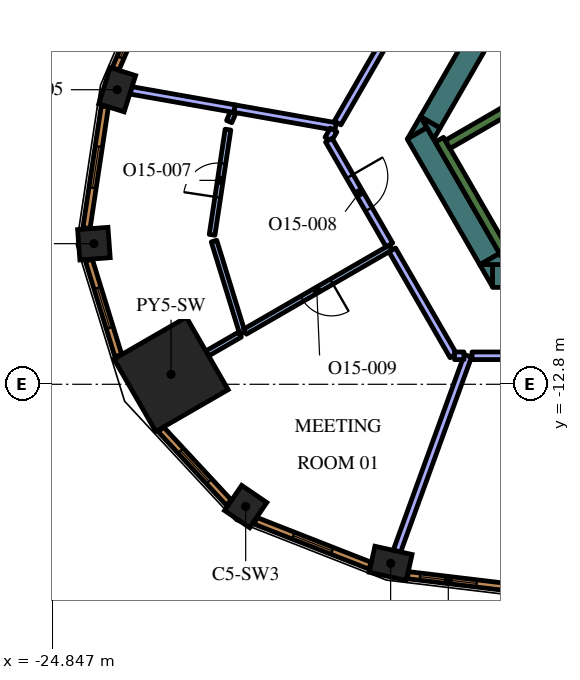
"""IFC4 building model, lengths in metres.
Left out: names, types, materials, properties, quantities, classifications, styles, units other than length and angle.
Written with IfcOpenShell. Run it as: python <this file> out.ifc"""

import sys

from ifc_helpers import new_model, si_unit, direction, frame, frame_2d, origin, origin_2d, place, context, subcontext, project, spatial, polyline, rectangle, outline, extrude, element, fill, save


model = new_model("IFC4")
c1 = context("Model", 3, precision=1e-05, world=origin(), true_north=direction((0.0, 1.0)))
c2 = subcontext(c1, "Body", "Model", "MODEL_VIEW")
j1 = project(units=[si_unit("LENGTHUNIT", "METRE"), si_unit("PLANEANGLEUNIT", "RADIAN")], contexts=[c1])
p1 = place(None, origin())
s1 = spatial("IfcSite", under=j1, at=p1, CompositionType="ELEMENT")
p2 = place(p1, origin())
s2 = spatial("IfcBuilding", under=s1, at=p2, CompositionType="ELEMENT")
p3 = place(p2, frame((0.0, 0.0, 317.4)))
s3 = spatial("IfcBuildingStorey", under=s2, at=p3, CompositionType="ELEMENT", Elevation=317.4)
p4 = place(p3, frame((-21.718, -12.539, 0.0), z_axis=(0.0, 0.0, 1.0), x_axis=(-0.866025403784, -0.5, 0.0)))
e1 = element("IfcColumn", 1, at=p4, inside=s3, PredefinedType="COLUMN", context=c2, shape_type="SweptSolid", body=[
    extrude(rectangle(XDim=2.2, YDim=2.2, at=origin_2d()), origin(), (0.0, 0.0, 1.0), 4.2),
])
for number, where, z_axis, x_axis in (
    (2, (-15.941, -17.512, 0.0), (0.0, 0.0, 1.0), (0.976, -0.217, 0.0)),
    (3, (-23.136, -5.049, 0.0), (0.0, 0.0, 1.0), (-0.3, -0.954, 0.0)),
):
    element("IfcColumn", number, at=place(p3, frame(where, z_axis=z_axis, x_axis=x_axis)), inside=s3, PredefinedType="COLUMN", context=c2, shape_type="SweptSolid", body=[
        extrude(rectangle(XDim=1.0, YDim=0.7, at=origin_2d()), origin(), (0.0, 0.0, 1.0), 4.2),
    ])
for number, where, z_axis, x_axis in (
    (4, (-23.748, -9.1, 0.0), (0.0, 0.0, 1.0), (0.075, -0.997, 0.0)),
    (5, (-19.754, -16.017, 0.0), (0.0, 0.0, 1.0), (0.826, -0.563, 0.0)),
):
    element("IfcColumn", number, at=place(p3, frame(where, z_axis=z_axis, x_axis=x_axis)), inside=s3, PredefinedType="COLUMN", context=c2, shape_type="SweptSolid", body=[
        extrude(rectangle(XDim=0.8, YDim=0.8, at=origin_2d()), origin(), (0.0, 0.0, 1.0), 4.2),
    ])
p5 = place(p3, frame((8.904, -9.95, 0.0), z_axis=(0.0, 0.0, 1.0), x_axis=(-1.0, 0.0, 0.0)))
e6 = element("IfcWall", 6, at=p5, inside=s3, PredefinedType="SOLIDWALL", context=c2, shape_type="SweptSolid", body=[
    extrude(rectangle(XDim=22.161, YDim=0.6, at=frame_2d((11.081, 0.0))), origin(), (0.0, 0.0, 1.0), 4.2),
])
p6 = place(p3, origin())
e7 = element("IfcWall", 7, at=p6, inside=s3, PredefinedType="SOLIDWALL", context=c2, shape_type="SweptSolid", body=[
    extrude(outline(polyline([(-13.597, -9.65), (-13.259, -9.65), (-13.259, -10.236), (-13.597, -9.65)])), origin(), (0.0, 0.0, 1.0), 4.2),
])
p7 = place(p3, frame((-13.333, -9.506, 0.0), z_axis=(0.0, 0.0, 1.0), x_axis=(-0.500019073792, 0.866014391245, 0.0)))
e8 = element("IfcWall", 8, at=p7, inside=s3, PredefinedType="SOLIDWALL", context=c2, shape_type="SweptSolid", body=[
    extrude(rectangle(XDim=3.823, YDim=0.6, at=frame_2d((1.912, 0.0))), origin(), (0.0, 0.0, 1.0), 4.2),
])
e9 = element("IfcWall", 9, at=p6, inside=s3, PredefinedType="SOLIDWALL", context=c2, shape_type="SweptSolid", body=[
    extrude(outline(polyline([(-14.987, -6.043), (-15.493, -6.335), (-15.156, -5.75), (-14.987, -6.043)])), origin(), (0.0, 0.0, 1.0), 4.2),
])
e10 = element("IfcWall", 10, at=p6, inside=s3, PredefinedType="SOLIDWALL", context=c2, shape_type="SweptSolid", body=[
    extrude(outline(polyline([(-12.904, -9.65), (-13.58, -9.65), (-13.073, -9.357), (-12.904, -9.65)])), origin(), (0.0, 0.0, 1.0), 4.2),
])
p8 = place(p3, frame((-13.432, -3.364, 0.0), z_axis=(0.0, 0.0, 1.0), x_axis=(-0.499960127962, -0.866048422692, 0.0)))
e11 = element("IfcWall", 11, at=p8, inside=s3, PredefinedType="SOLIDWALL", context=c2, shape_type="SweptSolid", body=[
    extrude(rectangle(XDim=2.934, YDim=0.6, at=frame_2d((1.467, 0.0))), origin(), (0.0, 0.0, 1.0), 4.2),
])
e12 = element("IfcWall", 12, at=p6, inside=s3, PredefinedType="SOLIDWALL", context=c2, shape_type="SweptSolid", body=[
    extrude(outline(polyline([(-14.809, -6.35), (-15.147, -5.764), (-14.64, -6.057), (-14.809, -6.35)])), origin(), (0.0, 0.0, 1.0), 4.2),
])
p9 = place(p3, frame((-12.84, -9.511, 0.0), z_axis=(0.0, 0.0, 1.0), x_axis=(-0.499997733992, 0.866026712061, 0.0)))
e13 = element("IfcWall", 13, at=p9, inside=s3, PredefinedType="SOLIDWALL", context=c2, shape_type="SweptSolid", body=[
    extrude(rectangle(XDim=3.634, YDim=0.25, at=frame_2d((1.817, 0.0))), origin(), (0.0, 0.0, 1.0), 4.2),
])
p10 = place(p3, frame((-14.44, -6.49, 0.0), z_axis=(0.0, 0.0, 1.0), x_axis=(0.866022966069, 0.500004222222, 0.0)))
e14 = element("IfcWall", 14, at=p10, inside=s3, PredefinedType="SOLIDWALL", context=c2, shape_type="SweptSolid", body=[
    extrude(rectangle(XDim=6.8, YDim=0.25, at=frame_2d((3.4, 0.0))), origin(), (0.0, 0.0, 1.0), 4.2),
])
p11 = place(p3, frame((-15.774, -17.19, 0.0), z_axis=(0.0, 0.0, 1.0), x_axis=(0.341821907823, 0.93976474893, 0.0)))
e15 = element("IfcWall", 15, at=p11, inside=s3, PredefinedType="PARTITIONING", context=c2, shape_type="SweptSolid", body=[
    extrude(rectangle(XDim=5.469, YDim=0.2, at=frame_2d((2.735, 0.0))), origin(), (0.0, 0.0, 1.0), 3.5),
])
p12 = place(p3, frame((-13.799, -12.05, 0.0), z_axis=(0.0, 0.0, 1.0), x_axis=(1.0, 0.0, 0.0)))
e16 = element("IfcWall", 16, at=p12, inside=s3, PredefinedType="PARTITIONING", context=c2, shape_type="SweptSolid", body=[
    extrude(rectangle(XDim=8.769, YDim=0.2, at=frame_2d((4.384, 0.0))), origin(), (0.0, 0.0, 1.0), 3.5),
])
p13 = place(p3, frame((-20.039, -5.549, 0.0), z_axis=(0.0, 0.0, 1.0), x_axis=(-0.984771168486, 0.173855531173, 0.0)))
e17 = element("IfcWall", 17, at=p13, inside=s3, PredefinedType="PARTITIONING", context=c2, shape_type="SweptSolid", body=[
    extrude(rectangle(XDim=2.778, YDim=0.2, at=frame_2d((1.389, 0.0))), origin(), (0.0, 0.0, 1.0), 3.5),
])
p14 = place(p3, frame((-17.388, -6.017, 0.0), z_axis=(0.0, 0.0, 1.0), x_axis=(-0.984769902927, 0.173862699534, 0.0)))
e18 = element("IfcWall", 18, at=p14, inside=s3, PredefinedType="PARTITIONING", context=c2, shape_type="SweptSolid", body=[
    extrude(rectangle(XDim=2.7, YDim=0.2, at=frame_2d((1.35, 0.0))), origin(), (0.0, 0.0, 1.0), 3.5),
])
p15 = place(p3, frame((-13.683, 0.4, 0.0), z_axis=(0.0, 0.0, 1.0), x_axis=(-0.500004109969, -0.86602303088, 0.0)))
e19 = element("IfcWall", 19, at=p15, inside=s3, PredefinedType="PARTITIONING", context=c2, shape_type="SweptSolid", body=[
    extrude(rectangle(XDim=7.303, YDim=0.2, at=frame_2d((3.652, 0.0))), origin(), (0.0, 0.0, 1.0), 3.5),
])
p16 = place(p15, frame((2.8, 0.0, 0.0)))
e20 = element("IfcOpeningElement", 20, at=p16, cuts=e19, PredefinedType="OPENING", context=c2, shape_type="SweptSolid", body=[
    extrude(rectangle(XDim=1.8, YDim=2.1, at=frame_2d((0.9, 1.05))), frame((0.0, 0.11, 0.0), z_axis=(0.0, -1.0, 0.0), x_axis=(1.0, 0.0, 0.0)), (0.0, 0.0, 1.0), 0.22),
])
p17 = place(p3, frame((-20.083, -5.643, 0.0), z_axis=(0.0, 0.0, 1.0), x_axis=(-0.392924203078, -0.919570862215, 0.0)))
e21 = element("IfcWall", 21, at=p17, inside=s3, PredefinedType="PARTITIONING", context=c2, shape_type="SweptSolid", body=[
    extrude(rectangle(XDim=0.267, YDim=0.15, at=frame_2d((0.133, 0.0))), origin(), (0.0, 0.0, 1.0), 3.5),
])
p18 = place(p3, frame((-20.638, -8.867, 0.0), z_axis=(0.0, 0.0, 1.0), x_axis=(0.149402322172, 0.988776489471, 0.0)))
e22 = element("IfcWall", 22, at=p18, inside=s3, PredefinedType="PARTITIONING", context=c2, shape_type="SweptSolid", body=[
    extrude(rectangle(XDim=2.799, YDim=0.15, at=frame_2d((1.4, 0.0))), origin(), (0.0, 0.0, 1.0), 3.5),
])
p19 = place(p18, frame((0.999, 0.0, 0.0)))
e23 = element("IfcOpeningElement", 23, at=p19, cuts=e22, PredefinedType="OPENING", context=c2, shape_type="SweptSolid", body=[
    extrude(rectangle(XDim=0.9, YDim=2.1, at=frame_2d((0.45, 1.05))), frame((0.0, 0.085, 0.0), z_axis=(0.0, -1.0, 0.0), x_axis=(1.0, 0.0, 0.0)), (0.0, 0.0, 1.0), 0.17),
])
p20 = place(p3, frame((-20.587, -9.032, 0.0), z_axis=(0.0, 0.0, 1.0), x_axis=(0.294593354479, -0.95562270562, 0.0)))
e24 = element("IfcWall", 24, at=p20, inside=s3, PredefinedType="PARTITIONING", context=c2, shape_type="SweptSolid", body=[
    extrude(rectangle(XDim=2.535, YDim=0.15, at=frame_2d((1.268, 0.0))), origin(), (0.0, 0.0, 1.0), 3.5),
])
p21 = place(p3, frame((-19.907, -11.493, 0.0), z_axis=(0.0, 0.0, 1.0), x_axis=(-0.866083074959, -0.499900097289, 0.0)))
e25 = element("IfcWall", 25, at=p21, inside=s3, PredefinedType="PARTITIONING", context=c2, shape_type="SweptSolid", body=[
    extrude(rectangle(XDim=0.991, YDim=0.15, at=frame_2d((0.496, 0.0))), origin(), (0.0, 0.0, 1.0), 3.5),
])
p22 = place(p3, frame((-15.935, -9.2, 0.0), z_axis=(0.0, 0.0, 1.0), x_axis=(-0.866021420858, -0.500006898567, 0.0)))
e26 = element("IfcWall", 26, at=p22, inside=s3, PredefinedType="PARTITIONING", context=c2, shape_type="SweptSolid", body=[
    extrude(rectangle(XDim=4.433, YDim=0.15, at=frame_2d((2.217, 0.0))), origin(), (0.0, 0.0, 1.0), 3.5),
])
p23 = place(p22, frame((1.8, 0.0, 0.0)))
e27 = element("IfcOpeningElement", 27, at=p23, cuts=e26, PredefinedType="OPENING", context=c2, shape_type="SweptSolid", body=[
    extrude(rectangle(XDim=0.9, YDim=2.1, at=frame_2d((0.45, 1.05))), frame((0.0, 0.085, 0.0), z_axis=(0.0, -1.0, 0.0), x_axis=(1.0, 0.0, 0.0)), (0.0, 0.0, 1.0), 0.17),
])
p24 = place(p3, frame((-17.441, -6.109, 0.0), z_axis=(0.0, 0.0, 1.0), x_axis=(-0.500102178127, -0.865966403178, 0.0)))
e28 = element("IfcWall", 28, at=p24, inside=s3, PredefinedType="PARTITIONING", context=c2, shape_type="SweptSolid", body=[
    extrude(rectangle(XDim=0.278, YDim=0.2, at=frame_2d((0.139, 0.0))), origin(), (0.0, 0.0, 1.0), 3.5),
])
p25 = place(p3, frame((-17.565, -6.376, 0.0), z_axis=(0.0, 0.0, 1.0), x_axis=(0.499963479838, -0.866046487683, 0.0)))
e29 = element("IfcWall", 29, at=p25, inside=s3, PredefinedType="PARTITIONING", context=c2, shape_type="SweptSolid", body=[
    extrude(rectangle(XDim=3.186, YDim=0.2, at=frame_2d((1.593, 0.0))), origin(), (0.0, 0.0, 1.0), 3.5),
])
p26 = place(p25, frame((1.1, 0.0, 0.0)))
e30 = element("IfcOpeningElement", 30, at=p26, cuts=e29, PredefinedType="OPENING", context=c2, shape_type="SweptSolid", body=[
    extrude(rectangle(XDim=1.0, YDim=2.1, at=frame_2d((0.5, 1.05))), frame((0.0, 0.11, 0.0), z_axis=(0.0, -1.0, 0.0), x_axis=(1.0, 0.0, 0.0)), (0.0, 0.0, 1.0), 0.22),
])
p27 = place(p3, frame((-15.897, -9.265, 0.0), z_axis=(0.0, 0.0, 1.0), x_axis=(0.500033484244, -0.866006070784, 0.0)))
e31 = element("IfcWall", 31, at=p27, inside=s3, PredefinedType="PARTITIONING", context=c2, shape_type="SweptSolid", body=[
    extrude(rectangle(XDim=3.216, YDim=0.2, at=frame_2d((1.608, 0.0))), origin(), (0.0, 0.0, 1.0), 3.5),
])
p28 = place(p3, frame((-14.26, -12.05, 0.0), z_axis=(0.0, 0.0, 1.0), x_axis=(1.0, 0.0, 0.0)))
e32 = element("IfcWall", 32, at=p28, inside=s3, PredefinedType="PARTITIONING", context=c2, shape_type="SweptSolid", body=[
    extrude(rectangle(XDim=0.248, YDim=0.2, at=frame_2d((0.124, 0.0))), origin(), (0.0, 0.0, 1.0), 3.5),
])
p29 = place(p3, frame((-15.487, -17.823, 0.0), z_axis=(0.0, 0.0, 1.0), x_axis=(0.992885582795, -0.119072328769, 0.0)))
e33 = element("IfcWall", 33, at=p29, inside=s3, PredefinedType="SOLIDWALL", context=c2, shape_type="SweptSolid", body=[
    extrude(rectangle(XDim=5.415, YDim=0.19, at=frame_2d((2.708, 0.0))), origin(), (0.0, 0.0, 1.0), 3.9),
])
p30 = place(p29, frame((0.323, 0.0, 0.6)))
e34 = element("IfcOpeningElement", 34, at=p30, cuts=e33, PredefinedType="OPENING", context=c2, shape_type="SweptSolid", body=[
    extrude(rectangle(XDim=1.5, YDim=2.85, at=frame_2d((0.75, 1.425))), frame((0.0, 0.105, 0.0), z_axis=(0.0, -1.0, 0.0), x_axis=(1.0, 0.0, 0.0)), (0.0, 0.0, 1.0), 0.21),
])
p31 = place(p29, frame((3.558, 0.0, 0.6)))
e35 = element("IfcOpeningElement", 35, at=p31, cuts=e33, PredefinedType="OPENING", context=c2, shape_type="SweptSolid", body=[
    extrude(rectangle(XDim=1.5, YDim=2.85, at=frame_2d((0.75, 1.425))), frame((0.0, 0.105, 0.0), z_axis=(0.0, -1.0, 0.0), x_axis=(1.0, 0.0, 0.0)), (0.0, 0.0, 1.0), 0.21),
])
p32 = place(p3, frame((-21.049, 0.478, 0.0), z_axis=(0.0, 0.0, 1.0), x_axis=(-0.393347848476, -0.919389726992, 0.0)))
e36 = element("IfcWall", 36, at=p32, inside=s3, PredefinedType="SOLIDWALL", context=c2, shape_type="SweptSolid", body=[
    extrude(rectangle(XDim=5.415, YDim=0.19, at=frame_2d((2.708, 0.0))), origin(), (0.0, 0.0, 1.0), 3.9),
])
p33 = place(p32, frame((0.357, 0.0, 0.6)))
e37 = element("IfcOpeningElement", 37, at=p33, cuts=e36, PredefinedType="OPENING", context=c2, shape_type="SweptSolid", body=[
    extrude(rectangle(XDim=1.5, YDim=2.85, at=frame_2d((0.75, 1.425))), frame((0.0, 0.105, 0.0), z_axis=(0.0, -1.0, 0.0), x_axis=(1.0, 0.0, 0.0)), (0.0, 0.0, 1.0), 0.21),
])
p34 = place(p32, frame((3.593, 0.0, 0.6)))
e38 = element("IfcOpeningElement", 38, at=p34, cuts=e36, PredefinedType="OPENING", context=c2, shape_type="SweptSolid", body=[
    extrude(rectangle(XDim=1.5, YDim=2.85, at=frame_2d((0.75, 1.425))), frame((0.0, 0.105, 0.0), z_axis=(0.0, -1.0, 0.0), x_axis=(1.0, 0.0, 0.0)), (0.0, 0.0, 1.0), 0.21),
])
p35 = place(p3, frame((-23.46, -5.488, 0.0), z_axis=(0.0, 0.0, 1.0), x_axis=(-0.149421055602, -0.988773658702, 0.0)))
e39 = element("IfcWall", 39, at=p35, inside=s3, PredefinedType="SOLIDWALL", context=c2, shape_type="SweptSolid", body=[
    extrude(rectangle(XDim=3.237, YDim=0.19, at=frame_2d((1.618, 0.0))), origin(), (0.0, 0.0, 1.0), 3.9),
])
p36 = place(p35, frame((1.068, 0.0, 0.6)))
e40 = element("IfcOpeningElement", 40, at=p36, cuts=e39, PredefinedType="OPENING", context=c2, shape_type="SweptSolid", body=[
    extrude(rectangle(XDim=1.1, YDim=2.85, at=frame_2d((0.55, 1.425))), frame((0.0, 0.105, 0.0), z_axis=(0.0, -1.0, 0.0), x_axis=(1.0, 0.0, 0.0)), (0.0, 0.0, 1.0), 0.21),
])
p37 = place(p3, frame((-23.881, -9.535, 0.0), z_axis=(0.0, 0.0, 1.0), x_axis=(0.294706210429, -0.9555879078, 0.0)))
e41 = element("IfcWall", 41, at=p37, inside=s3, PredefinedType="SOLIDWALL", context=c2, shape_type="SweptSolid", body=[
    extrude(rectangle(XDim=2.627, YDim=0.19, at=frame_2d((1.313, 0.0))), origin(), (0.0, 0.0, 1.0), 3.9),
])
p38 = place(p37, frame((0.763, 0.0, 0.6)))
e42 = element("IfcOpeningElement", 42, at=p38, cuts=e41, PredefinedType="OPENING", context=c2, shape_type="SweptSolid", body=[
    extrude(rectangle(XDim=1.1, YDim=2.85, at=frame_2d((0.55, 1.425))), frame((0.0, 0.105, 0.0), z_axis=(0.0, -1.0, 0.0), x_axis=(1.0, 0.0, 0.0)), (0.0, 0.0, 1.0), 0.21),
])
p39 = place(p3, frame((-21.985, -13.988, 0.0), z_axis=(0.0, 0.0, 1.0), x_axis=(0.680219354823, -0.733008614768, 0.0)))
e43 = element("IfcWall", 43, at=p39, inside=s3, PredefinedType="SOLIDWALL", context=c2, shape_type="SweptSolid", body=[
    extrude(rectangle(XDim=2.627, YDim=0.19, at=frame_2d((1.313, 0.0))), origin(), (0.0, 0.0, 1.0), 3.9),
])
p40 = place(p39, frame((0.763, 0.0, 0.6)))
e44 = element("IfcOpeningElement", 44, at=p40, cuts=e43, PredefinedType="OPENING", context=c2, shape_type="SweptSolid", body=[
    extrude(rectangle(XDim=1.1, YDim=2.85, at=frame_2d((0.55, 1.425))), frame((0.0, 0.105, 0.0), z_axis=(0.0, -1.0, 0.0), x_axis=(1.0, 0.0, 0.0)), (0.0, 0.0, 1.0), 0.21),
])
p41 = place(p3, frame((-19.496, -16.392, 0.0), z_axis=(0.0, 0.0, 1.0), x_axis=(0.93100888477, -0.364996515709, 0.0)))
e45 = element("IfcWall", 45, at=p41, inside=s3, PredefinedType="SOLIDWALL", context=c2, shape_type="SweptSolid", body=[
    extrude(rectangle(XDim=3.237, YDim=0.19, at=frame_2d((1.618, 0.0))), origin(), (0.0, 0.0, 1.0), 3.9),
])
p42 = place(p41, frame((1.068, 0.0, 0.6)))
e46 = element("IfcOpeningElement", 46, at=p42, cuts=e45, PredefinedType="OPENING", context=c2, shape_type="SweptSolid", body=[
    extrude(rectangle(XDim=1.1, YDim=2.85, at=frame_2d((0.55, 1.425))), frame((0.0, 0.105, 0.0), z_axis=(0.0, -1.0, 0.0), x_axis=(1.0, 0.0, 0.0)), (0.0, 0.0, 1.0), 0.21),
])
p43 = place(p19, origin())
e47 = element("IfcDoor", 47, at=p43, inside=s3, OperationType="SINGLE_SWING_RIGHT", PredefinedType="DOOR", context=c2, shape_type="SweptSolid", body=[
    extrude(rectangle(XDim=0.9, YDim=2.1, at=frame_2d((0.45, 1.05))), frame((0.0, 0.025, 0.0), z_axis=(0.0, -1.0, 0.0), x_axis=(1.0, 0.0, 0.0)), (0.0, 0.0, 1.0), 0.05),
])
fill(e23, e47)
p44 = place(p26, origin())
e48 = element("IfcDoor", 48, at=p44, inside=s3, OperationType="SINGLE_SWING_RIGHT", PredefinedType="DOOR", context=c2, shape_type="SweptSolid", body=[
    extrude(rectangle(XDim=1.0, YDim=2.1, at=frame_2d((0.5, 1.05))), frame((0.0, 0.025, 0.0), z_axis=(0.0, -1.0, 0.0), x_axis=(1.0, 0.0, 0.0)), (0.0, 0.0, 1.0), 0.05),
])
fill(e30, e48)
p45 = place(p23, origin())
e49 = element("IfcDoor", 49, at=p45, inside=s3, OperationType="SINGLE_SWING_RIGHT", PredefinedType="DOOR", context=c2, shape_type="SweptSolid", body=[
    extrude(rectangle(XDim=0.9, YDim=2.1, at=frame_2d((0.45, 1.05))), frame((0.0, 0.025, 0.0), z_axis=(0.0, -1.0, 0.0), x_axis=(1.0, 0.0, 0.0)), (0.0, 0.0, 1.0), 0.05),
])
fill(e27, e49)
p46 = place(p30, origin())
e50 = element("IfcWindow", 50, at=p46, inside=s3, PartitioningType="SINGLE_PANEL", PredefinedType="WINDOW", context=c2, shape_type="SweptSolid", body=[
    extrude(rectangle(XDim=1.5, YDim=2.85, at=frame_2d((0.75, 1.425))), frame((0.0, 0.045, 0.0), z_axis=(0.0, -1.0, 0.0), x_axis=(1.0, 0.0, 0.0)), (0.0, 0.0, 1.0), 0.06),
])
fill(e34, e50)
p47 = place(p34, origin())
e51 = element("IfcWindow", 51, at=p47, inside=s3, PartitioningType="SINGLE_PANEL", PredefinedType="WINDOW", context=c2, shape_type="SweptSolid", body=[
    extrude(rectangle(XDim=1.5, YDim=2.85, at=frame_2d((0.75, 1.425))), frame((0.0, 0.045, 0.0), z_axis=(0.0, -1.0, 0.0), x_axis=(1.0, 0.0, 0.0)), (0.0, 0.0, 1.0), 0.06),
])
fill(e38, e51)
p48 = place(p36, origin())
e52 = element("IfcWindow", 52, at=p48, inside=s3, PartitioningType="SINGLE_PANEL", PredefinedType="WINDOW", context=c2, shape_type="SweptSolid", body=[
    extrude(rectangle(XDim=1.1, YDim=2.85, at=frame_2d((0.55, 1.425))), frame((0.0, 0.045, 0.0), z_axis=(0.0, -1.0, 0.0), x_axis=(1.0, 0.0, 0.0)), (0.0, 0.0, 1.0), 0.06),
])
fill(e40, e52)
p49 = place(p38, origin())
e53 = element("IfcWindow", 53, at=p49, inside=s3, PartitioningType="SINGLE_PANEL", PredefinedType="WINDOW", context=c2, shape_type="SweptSolid", body=[
    extrude(rectangle(XDim=1.1, YDim=2.85, at=frame_2d((0.55, 1.425))), frame((0.0, 0.045, 0.0), z_axis=(0.0, -1.0, 0.0), x_axis=(1.0, 0.0, 0.0)), (0.0, 0.0, 1.0), 0.06),
])
fill(e42, e53)
p50 = place(p40, origin())
e54 = element("IfcWindow", 54, at=p50, inside=s3, PartitioningType="SINGLE_PANEL", PredefinedType="WINDOW", context=c2, shape_type="SweptSolid", body=[
    extrude(rectangle(XDim=1.1, YDim=2.85, at=frame_2d((0.55, 1.425))), frame((0.0, 0.045, 0.0), z_axis=(0.0, -1.0, 0.0), x_axis=(1.0, 0.0, 0.0)), (0.0, 0.0, 1.0), 0.06),
])
fill(e44, e54)
p51 = place(p42, origin())
e55 = element("IfcWindow", 55, at=p51, inside=s3, PartitioningType="SINGLE_PANEL", PredefinedType="WINDOW", context=c2, shape_type="SweptSolid", body=[
    extrude(rectangle(XDim=1.1, YDim=2.85, at=frame_2d((0.55, 1.425))), frame((0.0, 0.045, 0.0), z_axis=(0.0, -1.0, 0.0), x_axis=(1.0, 0.0, 0.0)), (0.0, 0.0, 1.0), 0.06),
])
fill(e46, e55)
save(model, sys.argv[1])
